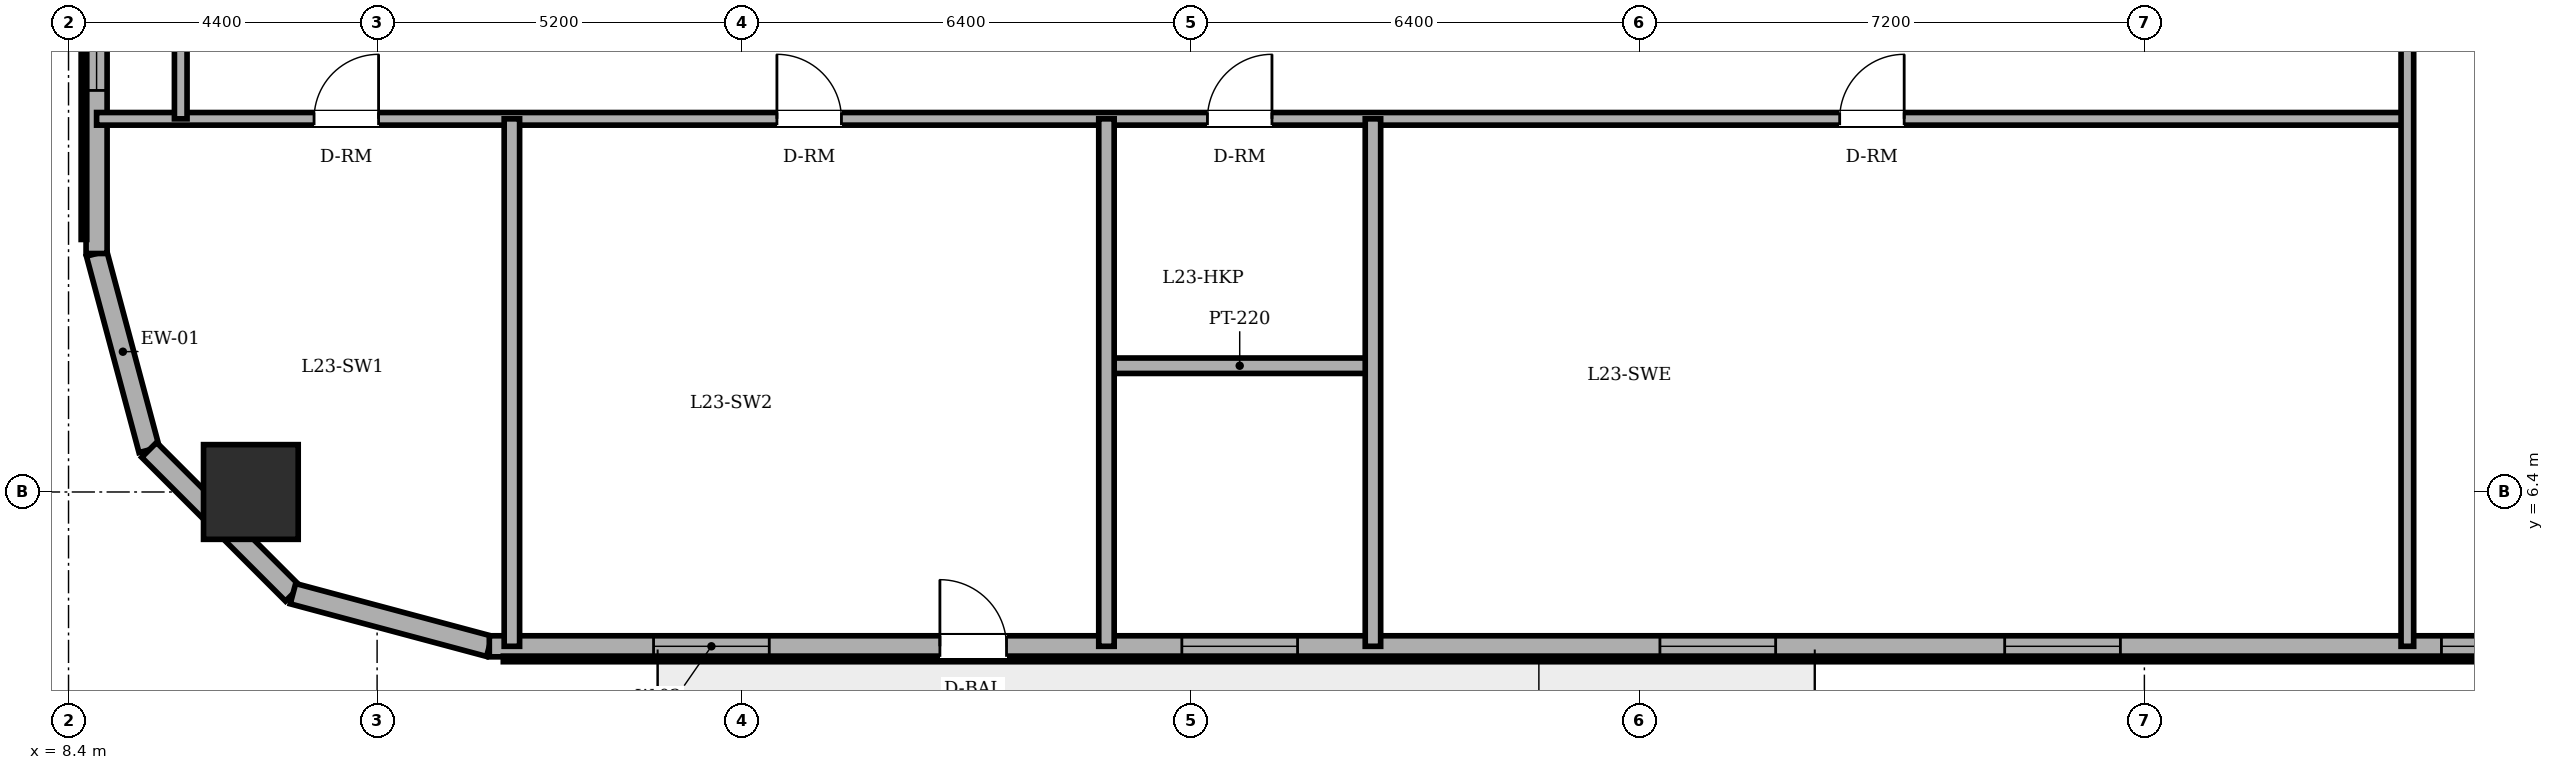
"""IFC4 building model, lengths in metres.
Left out: names, types, materials, properties, quantities, classifications, styles, units other than length and angle.
Written with IfcOpenShell. Run it as: python <this file> out.ifc"""

import sys

from ifc_helpers import new_model, si_unit, direction, frame, frame_2d, origin, origin_2d, place, context, subcontext, project, spatial, rectangle, circle, extrude, element, fill, save


model = new_model("IFC4")
c1 = context("Model", 3, precision=1e-05, world=origin(), true_north=direction((0.0, 1.0)))
c2 = subcontext(c1, "Body", "Model", "MODEL_VIEW")
j1 = project(units=[si_unit("LENGTHUNIT", "METRE"), si_unit("PLANEANGLEUNIT", "RADIAN")], contexts=[c1])
p1 = place(None, origin())
s1 = spatial("IfcSite", under=j1, at=p1, CompositionType="ELEMENT")
p2 = place(p1, origin())
s2 = spatial("IfcBuilding", under=s1, at=p2, CompositionType="ELEMENT")
p3 = place(p2, frame((0.0, 0.0, 89.9)))
s3 = spatial("IfcBuildingStorey", under=s2, at=p3, CompositionType="ELEMENT", Elevation=89.9)
p4 = place(p3, frame((11.0, 6.4, 0.0), z_axis=(0.0, 0.0, 1.0), x_axis=(1.0, 0.0, 0.0)))
e1 = element("IfcColumn", 1, at=p4, inside=s3, PredefinedType="COLUMN", context=c2, shape_type="SweptSolid", body=[
    extrude(circle(Radius=0.675, at=origin_2d()), origin(), (0.0, 0.0, 1.0), 3.6),
])
p5 = place(p3, frame((8.8, 9.8, 0.0), z_axis=(0.0, 0.0, 1.0), x_axis=(0.258731875344, -0.96594917914, 0.0)))
e2 = element("IfcWall", 2, at=p5, inside=s3, PredefinedType="SOLIDWALL", context=c2, shape_type="SweptSolid", body=[
    extrude(rectangle(XDim=2.899, YDim=0.3, at=frame_2d((1.449, 0.0))), origin(), (0.0, 0.0, 1.0), 3.4),
])
p6 = place(p3, frame((9.55, 7.0, 0.0), z_axis=(0.0, 0.0, 1.0), x_axis=(0.707106781187, -0.707106781187, 0.0)))
e3 = element("IfcWall", 3, at=p6, inside=s3, PredefinedType="SOLIDWALL", context=c2, shape_type="SweptSolid", body=[
    extrude(rectangle(XDim=2.899, YDim=0.3, at=frame_2d((1.45, 0.0))), origin(), (0.0, 0.0, 1.0), 3.4),
])
p7 = place(p3, frame((11.6, 4.95, 0.0), z_axis=(0.0, 0.0, 1.0), x_axis=(0.965943540406, -0.258752926066, 0.0)))
e4 = element("IfcWall", 4, at=p7, inside=s3, PredefinedType="SOLIDWALL", context=c2, shape_type="SweptSolid", body=[
    extrude(rectangle(XDim=2.898, YDim=0.3, at=frame_2d((1.449, 0.0))), origin(), (0.0, 0.0, 1.0), 3.4),
])
p8 = place(p3, frame((14.4, 4.2, 0.0), z_axis=(0.0, 0.0, 1.0), x_axis=(1.0, 0.0, 0.0)))
e5 = element("IfcWall", 5, at=p8, inside=s3, PredefinedType="SOLIDWALL", context=c2, shape_type="SweptSolid", body=[
    extrude(rectangle(XDim=29.933, YDim=0.3, at=frame_2d((14.967, 0.0))), origin(), (0.0, 0.0, 1.0), 3.4),
])
p9 = place(p8, frame((6.425, 0.0, 0.0)))
e6 = element("IfcOpeningElement", 6, at=p9, cuts=e5, PredefinedType="OPENING", context=c2, shape_type="SweptSolid", body=[
    extrude(rectangle(XDim=0.95, YDim=2.2, at=frame_2d((0.475, 1.1))), frame((0.0, 0.16, 0.0), z_axis=(0.0, -1.0, 0.0), x_axis=(1.0, 0.0, 0.0)), (0.0, 0.0, 1.0), 0.32),
])
p10 = place(p8, frame((2.342, 0.0, 0.85)))
e7 = element("IfcOpeningElement", 7, at=p10, cuts=e5, PredefinedType="OPENING", context=c2, shape_type="SweptSolid", body=[
    extrude(rectangle(XDim=1.65, YDim=1.55, at=frame_2d((0.825, 0.775))), frame((0.0, 0.16, 0.0), z_axis=(0.0, -1.0, 0.0), x_axis=(1.0, 0.0, 0.0)), (0.0, 0.0, 1.0), 0.32),
])
p11 = place(p8, frame((9.875, 0.0, 0.85)))
e8 = element("IfcOpeningElement", 8, at=p11, cuts=e5, PredefinedType="OPENING", context=c2, shape_type="SweptSolid", body=[
    extrude(rectangle(XDim=1.65, YDim=1.55, at=frame_2d((0.825, 0.775))), frame((0.0, 0.16, 0.0), z_axis=(0.0, -1.0, 0.0), x_axis=(1.0, 0.0, 0.0)), (0.0, 0.0, 1.0), 0.32),
])
p12 = place(p8, frame((16.692, 0.0, 0.85)))
e9 = element("IfcOpeningElement", 9, at=p12, cuts=e5, PredefinedType="OPENING", context=c2, shape_type="SweptSolid", body=[
    extrude(rectangle(XDim=1.65, YDim=1.55, at=frame_2d((0.825, 0.775))), frame((0.0, 0.16, 0.0), z_axis=(0.0, -1.0, 0.0), x_axis=(1.0, 0.0, 0.0)), (0.0, 0.0, 1.0), 0.32),
])
p13 = place(p8, frame((21.608, 0.0, 0.85)))
e10 = element("IfcOpeningElement", 10, at=p13, cuts=e5, PredefinedType="OPENING", context=c2, shape_type="SweptSolid", body=[
    extrude(rectangle(XDim=1.65, YDim=1.55, at=frame_2d((0.825, 0.775))), frame((0.0, 0.16, 0.0), z_axis=(0.0, -1.0, 0.0), x_axis=(1.0, 0.0, 0.0)), (0.0, 0.0, 1.0), 0.32),
])
p14 = place(p8, frame((27.836, 0.0, 0.85)))
e11 = element("IfcOpeningElement", 11, at=p14, cuts=e5, PredefinedType="OPENING", context=c2, shape_type="SweptSolid", body=[
    extrude(rectangle(XDim=1.05, YDim=1.55, at=frame_2d((0.525, 0.775))), frame((0.0, 0.16, 0.0), z_axis=(0.0, -1.0, 0.0), x_axis=(1.0, 0.0, 0.0)), (0.0, 0.0, 1.0), 0.32),
])
p15 = place(p3, frame((8.8, 38.2, 0.0), z_axis=(0.0, 0.0, 1.0), x_axis=(0.0, -1.0, 0.0)))
e12 = element("IfcWall", 12, at=p15, inside=s3, PredefinedType="SOLIDWALL", context=c2, shape_type="SweptSolid", body=[
    extrude(rectangle(XDim=28.4, YDim=0.3, at=frame_2d((14.2, 0.0))), origin(), (0.0, 0.0, 1.0), 3.4),
])
p16 = place(p15, frame((2.325, 0.0, 0.85)))
e13 = element("IfcOpeningElement", 13, at=p16, cuts=e12, PredefinedType="OPENING", context=c2, shape_type="SweptSolid", body=[
    extrude(rectangle(XDim=1.65, YDim=1.55, at=frame_2d((0.825, 0.775))), frame((0.0, 0.16, 0.0), z_axis=(0.0, -1.0, 0.0), x_axis=(1.0, 0.0, 0.0)), (0.0, 0.0, 1.0), 0.32),
])
p17 = place(p15, frame((7.328, 0.0, 0.85)))
e14 = element("IfcOpeningElement", 14, at=p17, cuts=e12, PredefinedType="OPENING", context=c2, shape_type="SweptSolid", body=[
    extrude(rectangle(XDim=1.65, YDim=1.55, at=frame_2d((0.825, 0.775))), frame((0.0, 0.16, 0.0), z_axis=(0.0, -1.0, 0.0), x_axis=(1.0, 0.0, 0.0)), (0.0, 0.0, 1.0), 0.32),
])
p18 = place(p15, frame((11.102, 0.0, 0.85)))
e15 = element("IfcOpeningElement", 15, at=p18, cuts=e12, PredefinedType="OPENING", context=c2, shape_type="SweptSolid", body=[
    extrude(rectangle(XDim=1.65, YDim=1.55, at=frame_2d((0.825, 0.775))), frame((0.0, 0.16, 0.0), z_axis=(0.0, -1.0, 0.0), x_axis=(1.0, 0.0, 0.0)), (0.0, 0.0, 1.0), 0.32),
])
p19 = place(p15, frame((17.648, 0.0, 0.85)))
e16 = element("IfcOpeningElement", 16, at=p19, cuts=e12, PredefinedType="OPENING", context=c2, shape_type="SweptSolid", body=[
    extrude(rectangle(XDim=1.65, YDim=1.55, at=frame_2d((0.825, 0.775))), frame((0.0, 0.16, 0.0), z_axis=(0.0, -1.0, 0.0), x_axis=(1.0, 0.0, 0.0)), (0.0, 0.0, 1.0), 0.32),
])
p20 = place(p15, frame((20.422, 0.0, 0.85)))
e17 = element("IfcOpeningElement", 17, at=p20, cuts=e12, PredefinedType="OPENING", context=c2, shape_type="SweptSolid", body=[
    extrude(rectangle(XDim=1.65, YDim=1.55, at=frame_2d((0.825, 0.775))), frame((0.0, 0.16, 0.0), z_axis=(0.0, -1.0, 0.0), x_axis=(1.0, 0.0, 0.0)), (0.0, 0.0, 1.0), 0.32),
])
p21 = place(p15, frame((24.425, 0.0, 0.85)))
e18 = element("IfcOpeningElement", 18, at=p21, cuts=e12, PredefinedType="OPENING", context=c2, shape_type="SweptSolid", body=[
    extrude(rectangle(XDim=1.65, YDim=1.55, at=frame_2d((0.825, 0.775))), frame((0.0, 0.16, 0.0), z_axis=(0.0, -1.0, 0.0), x_axis=(1.0, 0.0, 0.0)), (0.0, 0.0, 1.0), 0.32),
])
p22 = place(p3, frame((23.2, 8.2, 0.0), z_axis=(0.0, 0.0, 1.0), x_axis=(1.0, 0.0, 0.0)))
e19 = element("IfcWall", 19, at=p22, inside=s3, PredefinedType="PARTITIONING", context=c2, shape_type="SweptSolid", body=[
    extrude(rectangle(XDim=3.8, YDim=0.22, at=frame_2d((1.9, 0.0))), origin(), (0.0, 0.0, 1.0), 3.4),
])
p23 = place(p3, frame((8.8, 11.72, 0.0), z_axis=(0.0, 0.0, 1.0), x_axis=(1.0, 0.0, 0.0)))
e20 = element("IfcWall", 20, at=p23, inside=s3, PredefinedType="PARTITIONING", context=c2, shape_type="SweptSolid", body=[
    extrude(rectangle(XDim=32.95, YDim=0.18, at=frame_2d((16.475, 0.0))), origin(), (0.0, 0.0, 1.0), 3.4),
])
p24 = place(p23, frame((15.84, 0.0, 0.0)))
e21 = element("IfcOpeningElement", 21, at=p24, cuts=e20, PredefinedType="OPENING", context=c2, shape_type="SweptSolid", body=[
    extrude(rectangle(XDim=0.92, YDim=2.1, at=frame_2d((0.46, 1.05))), frame((0.0, 0.1, 0.0), z_axis=(0.0, -1.0, 0.0), x_axis=(1.0, 0.0, 0.0)), (0.0, 0.0, 1.0), 0.2),
])
p25 = place(p23, frame((3.101, 0.0, 0.0)))
e22 = element("IfcOpeningElement", 22, at=p25, cuts=e20, PredefinedType="OPENING", context=c2, shape_type="SweptSolid", body=[
    extrude(rectangle(XDim=0.92, YDim=2.1, at=frame_2d((0.46, 1.05))), frame((0.0, 0.1, 0.0), z_axis=(0.0, -1.0, 0.0), x_axis=(1.0, 0.0, 0.0)), (0.0, 0.0, 1.0), 0.2),
])
p26 = place(p23, frame((9.701, 0.0, 0.0)))
e23 = element("IfcOpeningElement", 23, at=p26, cuts=e20, PredefinedType="OPENING", context=c2, shape_type="SweptSolid", body=[
    extrude(rectangle(XDim=0.92, YDim=2.1, at=frame_2d((0.46, 1.05))), frame((0.0, 0.1, 0.0), z_axis=(0.0, -1.0, 0.0), x_axis=(1.0, 0.0, 0.0)), (0.0, 0.0, 1.0), 0.2),
])
p27 = place(p23, frame((24.855, 0.0, 0.0)))
e24 = element("IfcOpeningElement", 24, at=p27, cuts=e20, PredefinedType="OPENING", context=c2, shape_type="SweptSolid", body=[
    extrude(rectangle(XDim=0.92, YDim=2.1, at=frame_2d((0.46, 1.05))), frame((0.0, 0.1, 0.0), z_axis=(0.0, -1.0, 0.0), x_axis=(1.0, 0.0, 0.0)), (0.0, 0.0, 1.0), 0.2),
])
p28 = place(p3, frame((10.0, 11.72, 0.0), z_axis=(0.0, 0.0, 1.0), x_axis=(0.0, 1.0, 0.0)))
e25 = element("IfcWall", 25, at=p28, inside=s3, PredefinedType="PARTITIONING", context=c2, shape_type="SweptSolid", body=[
    extrude(rectangle(XDim=2.46, YDim=0.18, at=frame_2d((1.23, 0.0))), origin(), (0.0, 0.0, 1.0), 3.4),
])
for number, where, z_axis, x_axis in (
    (26, (14.722, 4.2, 0.0), (0.0, 0.0, 1.0), (0.0, 1.0, 0.0)),
    (27, (23.2, 4.2, 0.0), (0.0, 0.0, 1.0), (0.0, 1.0, 0.0)),
    (28, (27.0, 4.2, 0.0), (0.0, 0.0, 1.0), (0.0, 1.0, 0.0)),
):
    element("IfcWall", number, at=place(p3, frame(where, z_axis=z_axis, x_axis=x_axis)), inside=s3, PredefinedType="PARTITIONING", context=c2, shape_type="SweptSolid", body=[
        extrude(rectangle(XDim=7.52, YDim=0.22, at=frame_2d((3.76, 0.0))), origin(), (0.0, 0.0, 1.0), 3.4),
    ])
p29 = place(p3, frame((41.75, 4.2, 0.0), z_axis=(0.0, 0.0, 1.0), x_axis=(0.0, 1.0, 0.0)))
e29 = element("IfcWall", 29, at=p29, inside=s3, PredefinedType="PARTITIONING", context=c2, shape_type="SweptSolid", body=[
    extrude(rectangle(XDim=18.62, YDim=0.18, at=frame_2d((9.31, 0.0))), origin(), (0.0, 0.0, 1.0), 3.4),
])
p30 = place(p29, frame((12.31, 0.0, 0.0)))
e30 = element("IfcOpeningElement", 30, at=p30, cuts=e29, PredefinedType="OPENING", context=c2, shape_type="SweptSolid", body=[
    extrude(rectangle(XDim=1.0, YDim=2.15, at=frame_2d((0.5, 1.075))), frame((0.0, 0.1, 0.0), z_axis=(0.0, -1.0, 0.0), x_axis=(1.0, 0.0, 0.0)), (0.0, 0.0, 1.0), 0.2),
])
p31 = place(p9, origin())
e31 = element("IfcDoor", 31, at=p31, inside=s3, OperationType="SINGLE_SWING_LEFT", PredefinedType="DOOR", context=c2, shape_type="SweptSolid", body=[
    extrude(rectangle(XDim=0.95, YDim=2.2, at=frame_2d((0.475, 1.1))), frame((0.0, 0.025, 0.0), z_axis=(0.0, -1.0, 0.0), x_axis=(1.0, 0.0, 0.0)), (0.0, 0.0, 1.0), 0.05),
])
fill(e6, e31)
p32 = place(p10, origin())
e32 = element("IfcWindow", 32, at=p32, inside=s3, PartitioningType="DOUBLE_PANEL_VERTICAL", PredefinedType="WINDOW", context=c2, shape_type="SweptSolid", body=[
    extrude(rectangle(XDim=1.65, YDim=1.55, at=frame_2d((0.825, 0.775))), frame((0.0, 0.03, 0.0), z_axis=(0.0, -1.0, 0.0), x_axis=(1.0, 0.0, 0.0)), (0.0, 0.0, 1.0), 0.06),
])
fill(e7, e32)
p33 = place(p11, origin())
e33 = element("IfcWindow", 33, at=p33, inside=s3, PartitioningType="DOUBLE_PANEL_VERTICAL", PredefinedType="WINDOW", context=c2, shape_type="SweptSolid", body=[
    extrude(rectangle(XDim=1.65, YDim=1.55, at=frame_2d((0.825, 0.775))), frame((0.0, 0.03, 0.0), z_axis=(0.0, -1.0, 0.0), x_axis=(1.0, 0.0, 0.0)), (0.0, 0.0, 1.0), 0.06),
])
fill(e8, e33)
p34 = place(p12, origin())
e34 = element("IfcWindow", 34, at=p34, inside=s3, PartitioningType="DOUBLE_PANEL_VERTICAL", PredefinedType="WINDOW", context=c2, shape_type="SweptSolid", body=[
    extrude(rectangle(XDim=1.65, YDim=1.55, at=frame_2d((0.825, 0.775))), frame((0.0, 0.03, 0.0), z_axis=(0.0, -1.0, 0.0), x_axis=(1.0, 0.0, 0.0)), (0.0, 0.0, 1.0), 0.06),
])
fill(e9, e34)
p35 = place(p13, origin())
e35 = element("IfcWindow", 35, at=p35, inside=s3, PartitioningType="DOUBLE_PANEL_VERTICAL", PredefinedType="WINDOW", context=c2, shape_type="SweptSolid", body=[
    extrude(rectangle(XDim=1.65, YDim=1.55, at=frame_2d((0.825, 0.775))), frame((0.0, 0.03, 0.0), z_axis=(0.0, -1.0, 0.0), x_axis=(1.0, 0.0, 0.0)), (0.0, 0.0, 1.0), 0.06),
])
fill(e10, e35)
p36 = place(p21, origin())
e36 = element("IfcWindow", 36, at=p36, inside=s3, PartitioningType="DOUBLE_PANEL_VERTICAL", PredefinedType="WINDOW", context=c2, shape_type="SweptSolid", body=[
    extrude(rectangle(XDim=1.65, YDim=1.55, at=frame_2d((0.825, 0.775))), frame((0.0, 0.03, 0.0), z_axis=(0.0, -1.0, 0.0), x_axis=(1.0, 0.0, 0.0)), (0.0, 0.0, 1.0), 0.06),
])
fill(e18, e36)
p37 = place(p14, origin())
e37 = element("IfcWindow", 37, at=p37, inside=s3, PartitioningType="SINGLE_PANEL", PredefinedType="WINDOW", context=c2, shape_type="SweptSolid", body=[
    extrude(rectangle(XDim=1.05, YDim=1.55, at=frame_2d((0.525, 0.775))), frame((0.0, 0.03, 0.0), z_axis=(0.0, -1.0, 0.0), x_axis=(1.0, 0.0, 0.0)), (0.0, 0.0, 1.0), 0.06),
])
fill(e11, e37)
p38 = place(p24, origin())
e38 = element("IfcDoor", 38, at=p38, inside=s3, OperationType="SINGLE_SWING_RIGHT", PredefinedType="DOOR", context=c2, shape_type="SweptSolid", body=[
    extrude(rectangle(XDim=0.92, YDim=2.1, at=frame_2d((0.46, 1.05))), frame((0.0, 0.025, 0.0), z_axis=(0.0, -1.0, 0.0), x_axis=(1.0, 0.0, 0.0)), (0.0, 0.0, 1.0), 0.05),
])
fill(e21, e38)
p39 = place(p25, origin())
e39 = element("IfcDoor", 39, at=p39, inside=s3, OperationType="SINGLE_SWING_RIGHT", PredefinedType="DOOR", context=c2, shape_type="SweptSolid", body=[
    extrude(rectangle(XDim=0.92, YDim=2.1, at=frame_2d((0.46, 1.05))), frame((0.0, 0.025, 0.0), z_axis=(0.0, -1.0, 0.0), x_axis=(1.0, 0.0, 0.0)), (0.0, 0.0, 1.0), 0.05),
])
fill(e22, e39)
p40 = place(p26, origin())
e40 = element("IfcDoor", 40, at=p40, inside=s3, OperationType="SINGLE_SWING_LEFT", PredefinedType="DOOR", context=c2, shape_type="SweptSolid", body=[
    extrude(rectangle(XDim=0.92, YDim=2.1, at=frame_2d((0.46, 1.05))), frame((0.0, 0.025, 0.0), z_axis=(0.0, -1.0, 0.0), x_axis=(1.0, 0.0, 0.0)), (0.0, 0.0, 1.0), 0.05),
])
fill(e23, e40)
p41 = place(p27, origin())
e41 = element("IfcDoor", 41, at=p41, inside=s3, OperationType="SINGLE_SWING_RIGHT", PredefinedType="DOOR", context=c2, shape_type="SweptSolid", body=[
    extrude(rectangle(XDim=0.92, YDim=2.1, at=frame_2d((0.46, 1.05))), frame((0.0, 0.025, 0.0), z_axis=(0.0, -1.0, 0.0), x_axis=(1.0, 0.0, 0.0)), (0.0, 0.0, 1.0), 0.05),
])
fill(e24, e41)
save(model, sys.argv[1])
